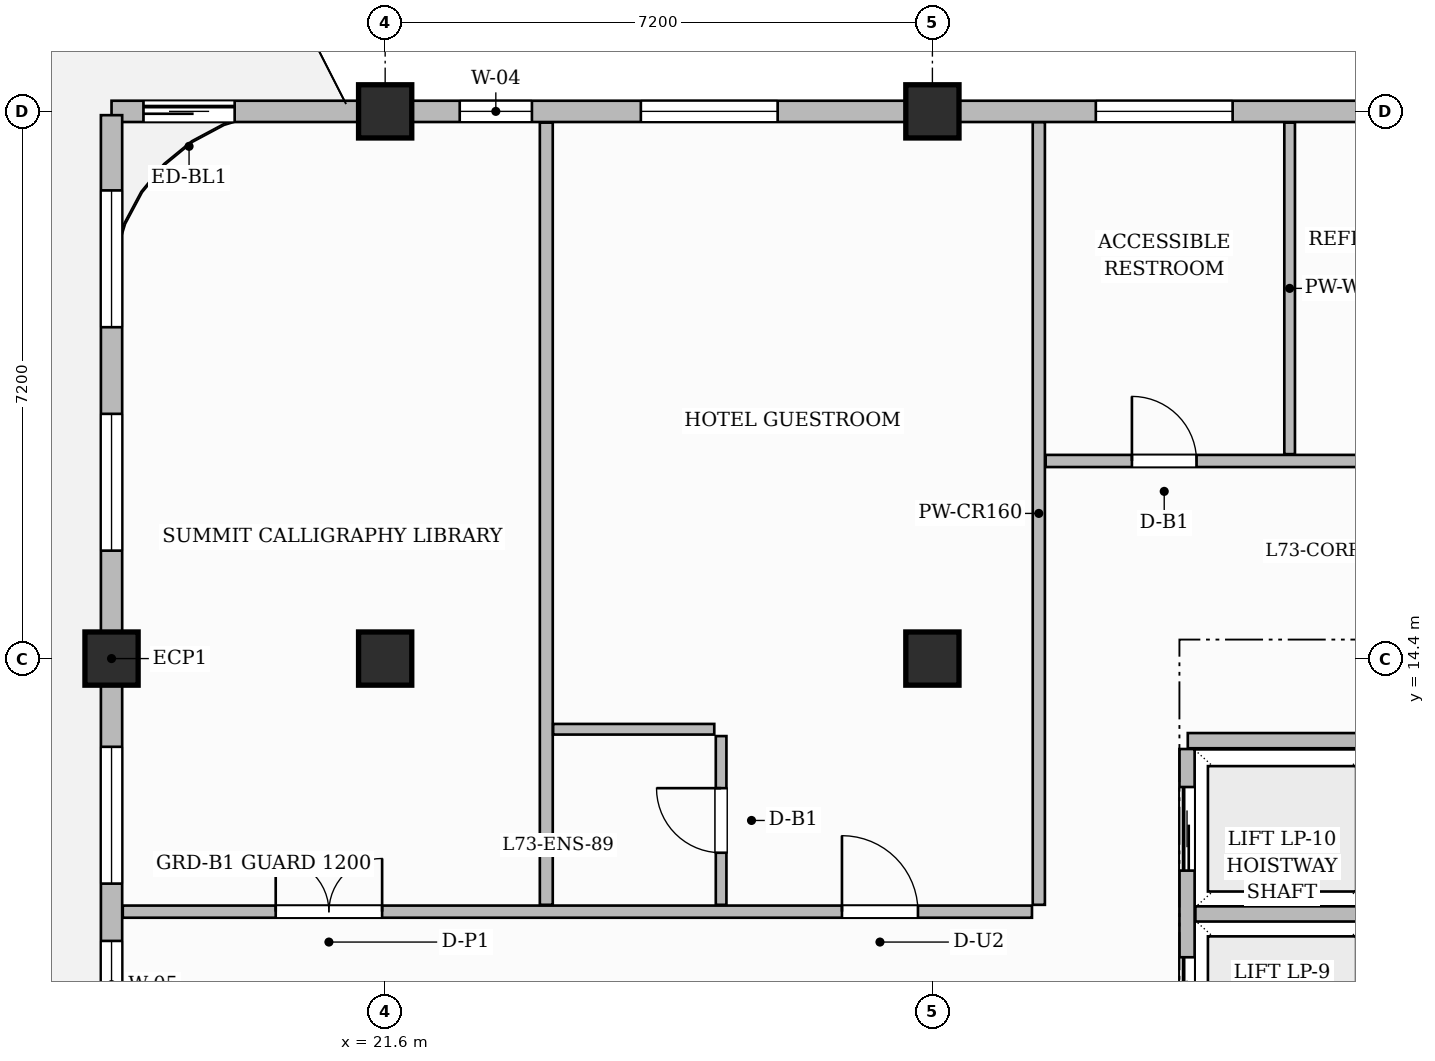
"""IFC4 building model, lengths in metres.
Left out: names, types, materials, properties, quantities, classifications, styles, units other than length and angle.
Written with IfcOpenShell. Run it as: python <this file> out.ifc"""

import sys

from ifc_helpers import new_model, si_unit, direction, frame, frame_2d, origin, origin_2d, place, context, subcontext, project, spatial, rectangle, extrude, source, transform, mapped, element, fill, save


model = new_model("IFC4")
c1 = context("Model", 3, precision=1e-05, world=origin(), true_north=direction((0.0, 1.0)))
c2 = subcontext(c1, "Body", "Model", "MODEL_VIEW")
j1 = project(units=[si_unit("LENGTHUNIT", "METRE"), si_unit("PLANEANGLEUNIT", "RADIAN")], contexts=[c1])
p1 = place(None, origin())
s1 = spatial("IfcSite", under=j1, at=p1, CompositionType="ELEMENT")
p2 = place(p1, origin())
s2 = spatial("IfcBuilding", under=s1, at=p2, CompositionType="ELEMENT")
p3 = place(p2, frame((0.0, 0.0, 290.45)))
s3 = spatial("IfcBuildingStorey", under=s2, at=p3, CompositionType="ELEMENT", Elevation=290.45)
m1 = source(origin(), c2, "Body", "SweptSolid", [
    extrude(rectangle(XDim=0.7, YDim=0.7, at=origin_2d()), origin(), (0.0, 0.0, 1.0), 3.85),
])
for number, where, z_axis, x_axis in (
    (1, (21.6, 14.4, 0.0), (0.0, 0.0, 1.0), (1.0, 0.0, 0.0)),
    (2, (21.6, 21.6, 0.0), (0.0, 0.0, 1.0), (1.0, 0.0, 0.0)),
    (3, (28.8, 14.4, 0.0), (0.0, 0.0, 1.0), (1.0, 0.0, 0.0)),
    (4, (28.8, 21.6, 0.0), (0.0, 0.0, 1.0), (1.0, 0.0, 0.0)),
    (5, (18.0, 14.4, 0.0), (0.0, 0.0, 1.0), (1.0, 0.0, 0.0)),
):
    element("IfcColumn", number, at=place(p3, frame(where, z_axis=z_axis, x_axis=x_axis)), inside=s3, PredefinedType="COLUMN", context=c2, shape_type="MappedRepresentation", body=[
        mapped(m1, transform((0.0, 0.0, 0.0), scale=1.0)),
    ])
p4 = place(p3, frame((32.16, 13.32, 0.0), z_axis=(0.0, 0.0, 1.0), x_axis=(1.0, 0.0, 0.0)))
e6 = element("IfcWall", 6, at=p4, inside=s3, PredefinedType="PARTITIONING", context=c2, shape_type="SweptSolid", body=[
    extrude(rectangle(XDim=2.385, YDim=0.2, at=frame_2d((1.192, 0.0))), origin(), (0.0, 0.0, 1.0), 3.55),
])
p5 = place(p3, frame((32.15, 4.39, 0.0), z_axis=(0.0, 0.0, 1.0), x_axis=(0.0, 1.0, 0.0)))
e7 = element("IfcWall", 7, at=p5, inside=s3, PredefinedType="PARTITIONING", context=c2, shape_type="SweptSolid", body=[
    extrude(rectangle(XDim=8.82, YDim=0.2, at=frame_2d((4.41, 0.0))), origin(), (0.0, 0.0, 1.0), 3.55),
])
p6 = place(p5, frame((0.5, 0.0, 0.0)))
e8 = element("IfcOpeningElement", 8, at=p6, cuts=e7, PredefinedType="OPENING", context=c2, shape_type="SweptSolid", body=[
    extrude(rectangle(XDim=1.1, YDim=2.2, at=frame_2d((0.55, 1.1))), frame((0.0, 0.11, 0.0), z_axis=(0.0, -1.0, 0.0), x_axis=(1.0, 0.0, 0.0)), (0.0, 0.0, 1.0), 0.22),
])
p7 = place(p5, frame((2.74, 0.0, 0.0)))
e9 = element("IfcOpeningElement", 9, at=p7, cuts=e7, PredefinedType="OPENING", context=c2, shape_type="SweptSolid", body=[
    extrude(rectangle(XDim=1.1, YDim=2.2, at=frame_2d((0.55, 1.1))), frame((0.0, 0.11, 0.0), z_axis=(0.0, -1.0, 0.0), x_axis=(1.0, 0.0, 0.0)), (0.0, 0.0, 1.0), 0.22),
])
p8 = place(p5, frame((4.98, 0.0, 0.0)))
e10 = element("IfcOpeningElement", 10, at=p8, cuts=e7, PredefinedType="OPENING", context=c2, shape_type="SweptSolid", body=[
    extrude(rectangle(XDim=1.1, YDim=2.2, at=frame_2d((0.55, 1.1))), frame((0.0, 0.11, 0.0), z_axis=(0.0, -1.0, 0.0), x_axis=(1.0, 0.0, 0.0)), (0.0, 0.0, 1.0), 0.22),
])
p9 = place(p5, frame((7.22, 0.0, 0.0)))
e11 = element("IfcOpeningElement", 11, at=p9, cuts=e7, PredefinedType="OPENING", context=c2, shape_type="SweptSolid", body=[
    extrude(rectangle(XDim=1.1, YDim=2.2, at=frame_2d((0.55, 1.1))), frame((0.0, 0.11, 0.0), z_axis=(0.0, -1.0, 0.0), x_axis=(1.0, 0.0, 0.0)), (0.0, 0.0, 1.0), 0.22),
])
p10 = place(p3, frame((32.26, 11.04, 0.0), z_axis=(0.0, 0.0, 1.0), x_axis=(1.0, 0.0, 0.0)))
e12 = element("IfcWall", 12, at=p10, inside=s3, PredefinedType="PARTITIONING", context=c2, shape_type="SweptSolid", body=[
    extrude(rectangle(XDim=2.255, YDim=0.2, at=frame_2d((1.127, 0.0))), origin(), (0.0, 0.0, 1.0), 3.55),
])
p11 = place(p3, frame((18.148, 11.07, 0.0), z_axis=(0.0, 0.0, 1.0), x_axis=(1.0, 0.0, 0.0)))
e13 = element("IfcWall", 13, at=p11, inside=s3, PredefinedType="PARTITIONING", context=c2, shape_type="SweptSolid", body=[
    extrude(rectangle(XDim=11.962, YDim=0.16, at=frame_2d((5.981, 0.0))), origin(), (0.0, 0.0, 1.0), 3.55),
])
p12 = place(p11, frame((2.012, 0.0, 0.0)))
e14 = element("IfcOpeningElement", 14, at=p12, cuts=e13, PredefinedType="OPENING", context=c2, shape_type="SweptSolid", body=[
    extrude(rectangle(XDim=1.4, YDim=2.35, at=frame_2d((0.7, 1.175))), frame((0.0, 0.09, 0.0), z_axis=(0.0, -1.0, 0.0), x_axis=(1.0, 0.0, 0.0)), (0.0, 0.0, 1.0), 0.18),
])
p13 = place(p11, frame((9.462, 0.0, 0.0)))
e15 = element("IfcOpeningElement", 15, at=p13, cuts=e13, PredefinedType="OPENING", context=c2, shape_type="SweptSolid", body=[
    extrude(rectangle(XDim=1.0, YDim=2.2, at=frame_2d((0.5, 1.1))), frame((0.0, 0.09, 0.0), z_axis=(0.0, -1.0, 0.0), x_axis=(1.0, 0.0, 0.0)), (0.0, 0.0, 1.0), 0.18),
])
p14 = place(p3, frame((30.2, 11.16, 0.0), z_axis=(0.0, 0.0, 1.0), x_axis=(0.0, 1.0, 0.0)))
e16 = element("IfcWall", 16, at=p14, inside=s3, PredefinedType="PARTITIONING", context=c2, shape_type="SweptSolid", body=[
    extrude(rectangle(XDim=10.3, YDim=0.16, at=frame_2d((5.15, 0.0))), origin(), (0.0, 0.0, 1.0), 3.55),
])
p15 = place(p3, frame((30.29, 17.0, 0.0), z_axis=(0.0, 0.0, 1.0), x_axis=(1.0, 0.0, 0.0)))
e17 = element("IfcWall", 17, at=p15, inside=s3, PredefinedType="PARTITIONING", context=c2, shape_type="SweptSolid", body=[
    extrude(rectangle(XDim=19.37, YDim=0.16, at=frame_2d((9.685, 0.0))), origin(), (0.0, 0.0, 1.0), 3.55),
])
p16 = place(p15, frame((1.135, 0.0, 0.0)))
e18 = element("IfcOpeningElement", 18, at=p16, cuts=e17, PredefinedType="OPENING", context=c2, shape_type="SweptSolid", body=[
    extrude(rectangle(XDim=0.85, YDim=2.1, at=frame_2d((0.425, 1.05))), frame((0.0, 0.09, 0.0), z_axis=(0.0, -1.0, 0.0), x_axis=(1.0, 0.0, 0.0)), (0.0, 0.0, 1.0), 0.18),
])
p17 = place(p15, frame((5.71, 0.0, 0.0)))
e19 = element("IfcOpeningElement", 19, at=p17, cuts=e17, PredefinedType="OPENING", context=c2, shape_type="SweptSolid", body=[
    extrude(rectangle(XDim=0.9, YDim=2.15, at=frame_2d((0.45, 1.075))), frame((0.0, 0.09, 0.0), z_axis=(0.0, -1.0, 0.0), x_axis=(1.0, 0.0, 0.0)), (0.0, 0.0, 1.0), 0.18),
])
p18 = place(p15, frame((10.635, 0.0, 0.0)))
e20 = element("IfcOpeningElement", 20, at=p18, cuts=e17, PredefinedType="OPENING", context=c2, shape_type="SweptSolid", body=[
    extrude(rectangle(XDim=0.95, YDim=2.15, at=frame_2d((0.475, 1.075))), frame((0.0, 0.09, 0.0), z_axis=(0.0, -1.0, 0.0), x_axis=(1.0, 0.0, 0.0)), (0.0, 0.0, 1.0), 0.18),
])
p19 = place(p15, frame((16.235, 0.0, 0.0)))
e21 = element("IfcOpeningElement", 21, at=p19, cuts=e17, PredefinedType="OPENING", context=c2, shape_type="SweptSolid", body=[
    extrude(rectangle(XDim=0.95, YDim=2.15, at=frame_2d((0.475, 1.075))), frame((0.0, 0.09, 0.0), z_axis=(0.0, -1.0, 0.0), x_axis=(1.0, 0.0, 0.0)), (0.0, 0.0, 1.0), 0.18),
])
p20 = place(p3, frame((33.5, 17.09, 0.0), z_axis=(0.0, 0.0, 1.0), x_axis=(0.0, 1.0, 0.0)))
e22 = element("IfcWall", 22, at=p20, inside=s3, PredefinedType="PARTITIONING", context=c2, shape_type="SweptSolid", body=[
    extrude(rectangle(XDim=4.362, YDim=0.14, at=frame_2d((2.181, 0.0))), origin(), (0.0, 0.0, 1.0), 3.55),
])
p21 = place(p3, frame((23.72, 11.16, 0.0), z_axis=(0.0, 0.0, 1.0), x_axis=(0.0, 1.0, 0.0)))
e23 = element("IfcWall", 23, at=p21, inside=s3, PredefinedType="PARTITIONING", context=c2, shape_type="SweptSolid", body=[
    extrude(rectangle(XDim=10.292, YDim=0.17, at=frame_2d((5.146, 0.0))), origin(), (0.0, 0.0, 1.0), 3.55),
])
p22 = place(p3, frame((26.02, 11.16, 0.0), z_axis=(0.0, 0.0, 1.0), x_axis=(0.0, 1.0, 0.0)))
e24 = element("IfcWall", 24, at=p22, inside=s3, PredefinedType="PARTITIONING", context=c2, shape_type="SweptSolid", body=[
    extrude(rectangle(XDim=2.22, YDim=0.14, at=frame_2d((1.11, 0.0))), origin(), (0.0, 0.0, 1.0), 3.55),
])
p23 = place(p22, frame((0.685, 0.0, 0.0)))
e25 = element("IfcOpeningElement", 25, at=p23, cuts=e24, PredefinedType="OPENING", context=c2, shape_type="SweptSolid", body=[
    extrude(rectangle(XDim=0.85, YDim=2.1, at=frame_2d((0.425, 1.05))), frame((0.0, 0.08, 0.0), z_axis=(0.0, -1.0, 0.0), x_axis=(1.0, 0.0, 0.0)), (0.0, 0.0, 1.0), 0.16),
])
p24 = place(p3, frame((23.81, 13.47, 0.0), z_axis=(0.0, 0.0, 1.0), x_axis=(1.0, 0.0, 0.0)))
e26 = element("IfcWall", 26, at=p24, inside=s3, PredefinedType="PARTITIONING", context=c2, shape_type="SweptSolid", body=[
    extrude(rectangle(XDim=2.12, YDim=0.14, at=frame_2d((1.06, 0.0))), origin(), (0.0, 0.0, 1.0), 3.55),
])
p25 = place(p3, frame((18.0, 21.6, 0.0), z_axis=(0.0, 0.0, 1.0), x_axis=(1.0, 0.0, 0.0)))
e27 = element("IfcWall", 27, at=p25, inside=s3, PredefinedType="SOLIDWALL", context=c2, shape_type="SweptSolid", body=[
    extrude(rectangle(XDim=31.8, YDim=0.28, at=frame_2d((15.9, 0.0))), origin(), (0.0, 0.0, 1.0), 3.135),
])
p26 = place(p25, frame((0.42, 0.0, 0.0)))
e28 = element("IfcOpeningElement", 28, at=p26, cuts=e27, PredefinedType="OPENING", context=c2, shape_type="SweptSolid", body=[
    extrude(rectangle(XDim=1.2, YDim=2.2, at=frame_2d((0.6, 1.1))), frame((0.0, 0.15, 0.0), z_axis=(0.0, -1.0, 0.0), x_axis=(1.0, 0.0, 0.0)), (0.0, 0.0, 1.0), 0.3),
])
p27 = place(p25, frame((4.581, 0.0, 0.8)))
e29 = element("IfcOpeningElement", 29, at=p27, cuts=e27, PredefinedType="OPENING", context=c2, shape_type="SweptSolid", body=[
    extrude(rectangle(XDim=0.95, YDim=1.75, at=frame_2d((0.475, 0.875))), frame((0.0, 0.15, 0.0), z_axis=(0.0, -1.0, 0.0), x_axis=(1.0, 0.0, 0.0)), (0.0, 0.0, 1.0), 0.3),
])
p28 = place(p25, frame((6.964, 0.0, 0.8)))
e30 = element("IfcOpeningElement", 30, at=p28, cuts=e27, PredefinedType="OPENING", context=c2, shape_type="SweptSolid", body=[
    extrude(rectangle(XDim=1.8, YDim=1.85, at=frame_2d((0.9, 0.925))), frame((0.0, 0.15, 0.0), z_axis=(0.0, -1.0, 0.0), x_axis=(1.0, 0.0, 0.0)), (0.0, 0.0, 1.0), 0.3),
])
p29 = place(p25, frame((12.95, 0.0, 0.8)))
e31 = element("IfcOpeningElement", 31, at=p29, cuts=e27, PredefinedType="OPENING", context=c2, shape_type="SweptSolid", body=[
    extrude(rectangle(XDim=1.8, YDim=1.85, at=frame_2d((0.9, 0.925))), frame((0.0, 0.15, 0.0), z_axis=(0.0, -1.0, 0.0), x_axis=(1.0, 0.0, 0.0)), (0.0, 0.0, 1.0), 0.3),
])
p30 = place(p25, frame((18.596, 0.0, 0.8)))
e32 = element("IfcOpeningElement", 32, at=p30, cuts=e27, PredefinedType="OPENING", context=c2, shape_type="SweptSolid", body=[
    extrude(rectangle(XDim=1.8, YDim=1.85, at=frame_2d((0.9, 0.925))), frame((0.0, 0.15, 0.0), z_axis=(0.0, -1.0, 0.0), x_axis=(1.0, 0.0, 0.0)), (0.0, 0.0, 1.0), 0.3),
])
p31 = place(p25, frame((21.729, 0.0, 0.8)))
e33 = element("IfcOpeningElement", 33, at=p31, cuts=e27, PredefinedType="OPENING", context=c2, shape_type="SweptSolid", body=[
    extrude(rectangle(XDim=1.15, YDim=1.8, at=frame_2d((0.575, 0.9))), frame((0.0, 0.15, 0.0), z_axis=(0.0, -1.0, 0.0), x_axis=(1.0, 0.0, 0.0)), (0.0, 0.0, 1.0), 0.3),
])
p32 = place(p25, frame((25.121, 0.0, 0.8)))
e34 = element("IfcOpeningElement", 34, at=p32, cuts=e27, PredefinedType="OPENING", context=c2, shape_type="SweptSolid", body=[
    extrude(rectangle(XDim=0.95, YDim=1.75, at=frame_2d((0.475, 0.875))), frame((0.0, 0.15, 0.0), z_axis=(0.0, -1.0, 0.0), x_axis=(1.0, 0.0, 0.0)), (0.0, 0.0, 1.0), 0.3),
])
p33 = place(p25, frame((27.804, 0.0, 0.8)))
e35 = element("IfcOpeningElement", 35, at=p33, cuts=e27, PredefinedType="OPENING", context=c2, shape_type="SweptSolid", body=[
    extrude(rectangle(XDim=1.8, YDim=1.85, at=frame_2d((0.9, 0.925))), frame((0.0, 0.15, 0.0), z_axis=(0.0, -1.0, 0.0), x_axis=(1.0, 0.0, 0.0)), (0.0, 0.0, 1.0), 0.3),
])
p34 = place(p3, frame((18.0, 0.05, 0.0), z_axis=(0.0, 0.0, 1.0), x_axis=(0.0, 1.0, 0.0)))
e36 = element("IfcWall", 36, at=p34, inside=s3, PredefinedType="SOLIDWALL", context=c2, shape_type="SweptSolid", body=[
    extrude(rectangle(XDim=21.5, YDim=0.28, at=frame_2d((10.75, 0.0))), origin(), (0.0, 0.0, 1.0), 3.55),
])
p35 = place(p34, frame((0.99, 0.0, 0.8)))
e37 = element("IfcOpeningElement", 37, at=p35, cuts=e36, PredefinedType="OPENING", context=c2, shape_type="SweptSolid", body=[
    extrude(rectangle(XDim=1.8, YDim=1.85, at=frame_2d((0.9, 0.925))), frame((0.0, 0.15, 0.0), z_axis=(0.0, -1.0, 0.0), x_axis=(1.0, 0.0, 0.0)), (0.0, 0.0, 1.0), 0.3),
])
p36 = place(p34, frame((3.93, 0.0, 0.8)))
e38 = element("IfcOpeningElement", 38, at=p36, cuts=e36, PredefinedType="OPENING", context=c2, shape_type="SweptSolid", body=[
    extrude(rectangle(XDim=1.8, YDim=1.85, at=frame_2d((0.9, 0.925))), frame((0.0, 0.15, 0.0), z_axis=(0.0, -1.0, 0.0), x_axis=(1.0, 0.0, 0.0)), (0.0, 0.0, 1.0), 0.3),
])
p37 = place(p34, frame((9.485, 0.0, 0.8)))
e39 = element("IfcOpeningElement", 39, at=p37, cuts=e36, PredefinedType="OPENING", context=c2, shape_type="SweptSolid", body=[
    extrude(rectangle(XDim=1.15, YDim=1.8, at=frame_2d((0.575, 0.9))), frame((0.0, 0.15, 0.0), z_axis=(0.0, -1.0, 0.0), x_axis=(1.0, 0.0, 0.0)), (0.0, 0.0, 1.0), 0.3),
])
p38 = place(p34, frame((11.389, 0.0, 0.8)))
e40 = element("IfcOpeningElement", 40, at=p38, cuts=e36, PredefinedType="OPENING", context=c2, shape_type="SweptSolid", body=[
    extrude(rectangle(XDim=1.8, YDim=1.85, at=frame_2d((0.9, 0.925))), frame((0.0, 0.15, 0.0), z_axis=(0.0, -1.0, 0.0), x_axis=(1.0, 0.0, 0.0)), (0.0, 0.0, 1.0), 0.3),
])
p39 = place(p34, frame((15.77, 0.0, 0.8)))
e41 = element("IfcOpeningElement", 41, at=p39, cuts=e36, PredefinedType="OPENING", context=c2, shape_type="SweptSolid", body=[
    extrude(rectangle(XDim=1.8, YDim=1.85, at=frame_2d((0.9, 0.925))), frame((0.0, 0.15, 0.0), z_axis=(0.0, -1.0, 0.0), x_axis=(1.0, 0.0, 0.0)), (0.0, 0.0, 1.0), 0.3),
])
p40 = place(p34, frame((18.71, 0.0, 0.8)))
e42 = element("IfcOpeningElement", 42, at=p40, cuts=e36, PredefinedType="OPENING", context=c2, shape_type="SweptSolid", body=[
    extrude(rectangle(XDim=1.8, YDim=1.85, at=frame_2d((0.9, 0.925))), frame((0.0, 0.15, 0.0), z_axis=(0.0, -1.0, 0.0), x_axis=(1.0, 0.0, 0.0)), (0.0, 0.0, 1.0), 0.3),
])
m2 = source(origin(), c2, "Body", "SweptSolid", [
    extrude(rectangle(XDim=0.85, YDim=2.1, at=frame_2d((0.425, 1.05))), frame((0.0, 0.025, 0.0), z_axis=(0.0, -1.0, 0.0), x_axis=(1.0, 0.0, 0.0)), (0.0, 0.0, 1.0), 0.05),
])
p41 = place(p16, origin())
e43 = element("IfcDoor", 43, at=p41, inside=s3, OperationType="SINGLE_SWING_LEFT", PredefinedType="DOOR", context=c2, shape_type="MappedRepresentation", body=[
    mapped(m2, transform((0.0, 0.0, 0.0), scale=1.0)),
])
fill(e18, e43)
m3 = source(origin(), c2, "Body", "SweptSolid", [
    extrude(rectangle(XDim=1.4, YDim=2.35, at=frame_2d((0.7, 1.175))), frame((0.0, 0.025, 0.0), z_axis=(0.0, -1.0, 0.0), x_axis=(1.0, 0.0, 0.0)), (0.0, 0.0, 1.0), 0.05),
])
p42 = place(p12, origin())
e44 = element("IfcDoor", 44, at=p42, inside=s3, OperationType="DOUBLE_DOOR_SINGLE_SWING", PredefinedType="DOOR", context=c2, shape_type="MappedRepresentation", body=[
    mapped(m3, transform((0.0, 0.0, 0.0), scale=1.0)),
])
fill(e14, e44)
p43 = place(p23, origin())
e45 = element("IfcDoor", 45, at=p43, inside=s3, OperationType="SINGLE_SWING_RIGHT", PredefinedType="DOOR", context=c2, shape_type="MappedRepresentation", body=[
    mapped(m2, transform((0.0, 0.0, 0.0), scale=1.0)),
])
fill(e25, e45)
m4 = source(origin(), c2, "Body", "SweptSolid", [
    extrude(rectangle(XDim=1.0, YDim=2.2, at=frame_2d((0.5, 1.1))), frame((0.0, 0.025, 0.0), z_axis=(0.0, -1.0, 0.0), x_axis=(1.0, 0.0, 0.0)), (0.0, 0.0, 1.0), 0.05),
])
p44 = place(p13, origin())
e46 = element("IfcDoor", 46, at=p44, inside=s3, OperationType="SINGLE_SWING_LEFT", PredefinedType="DOOR", context=c2, shape_type="MappedRepresentation", body=[
    mapped(m4, transform((0.0, 0.0, 0.0), scale=1.0)),
])
fill(e15, e46)
m5 = source(origin(), c2, "Body", "SweptSolid", [
    extrude(rectangle(XDim=1.1, YDim=2.2, at=frame_2d((0.55, 1.1))), frame((0.0, 0.025, 0.0), z_axis=(0.0, -1.0, 0.0), x_axis=(1.0, 0.0, 0.0)), (0.0, 0.0, 1.0), 0.05),
])
p45 = place(p8, origin())
e47 = element("IfcDoor", 47, at=p45, inside=s3, OperationType="SLIDING_TO_LEFT", PredefinedType="DOOR", context=c2, shape_type="MappedRepresentation", body=[
    mapped(m5, transform((0.0, 0.0, 0.0), scale=1.0)),
])
fill(e10, e47)
p46 = place(p9, origin())
e48 = element("IfcDoor", 48, at=p46, inside=s3, OperationType="SLIDING_TO_LEFT", PredefinedType="DOOR", context=c2, shape_type="MappedRepresentation", body=[
    mapped(m5, transform((0.0, 0.0, 0.0), scale=1.0)),
])
fill(e11, e48)
m6 = source(origin(), c2, "Body", "SweptSolid", [
    extrude(rectangle(XDim=1.2, YDim=2.2, at=frame_2d((0.6, 1.1))), frame((0.0, 0.025, 0.0), z_axis=(0.0, -1.0, 0.0), x_axis=(1.0, 0.0, 0.0)), (0.0, 0.0, 1.0), 0.05),
])
p47 = place(p26, origin())
e49 = element("IfcDoor", 49, at=p47, inside=s3, OperationType="SLIDING_TO_LEFT", PredefinedType="DOOR", context=c2, shape_type="MappedRepresentation", body=[
    mapped(m6, transform((0.0, 0.0, 0.0), scale=1.0)),
])
fill(e28, e49)
m7 = source(origin(), c2, "Body", "SweptSolid", [
    extrude(rectangle(XDim=0.95, YDim=1.75, at=frame_2d((0.475, 0.875))), frame((0.0, 0.03, 0.0), z_axis=(0.0, -1.0, 0.0), x_axis=(1.0, 0.0, 0.0)), (0.0, 0.0, 1.0), 0.06),
])
p48 = place(p27, origin())
e50 = element("IfcWindow", 50, at=p48, inside=s3, PartitioningType="SINGLE_PANEL", PredefinedType="WINDOW", context=c2, shape_type="MappedRepresentation", body=[
    mapped(m7, transform((0.0, 0.0, 0.0), scale=1.0)),
])
fill(e29, e50)
m8 = source(origin(), c2, "Body", "SweptSolid", [
    extrude(rectangle(XDim=1.8, YDim=1.85, at=frame_2d((0.9, 0.925))), frame((0.0, 0.03, 0.0), z_axis=(0.0, -1.0, 0.0), x_axis=(1.0, 0.0, 0.0)), (0.0, 0.0, 1.0), 0.06),
])
p49 = place(p28, origin())
e51 = element("IfcWindow", 51, at=p49, inside=s3, PartitioningType="DOUBLE_PANEL_VERTICAL", PredefinedType="WINDOW", context=c2, shape_type="MappedRepresentation", body=[
    mapped(m8, transform((0.0, 0.0, 0.0), scale=1.0)),
])
fill(e30, e51)
p50 = place(p29, origin())
e52 = element("IfcWindow", 52, at=p50, inside=s3, PartitioningType="DOUBLE_PANEL_VERTICAL", PredefinedType="WINDOW", context=c2, shape_type="MappedRepresentation", body=[
    mapped(m8, transform((0.0, 0.0, 0.0), scale=1.0)),
])
fill(e31, e52)
m9 = source(origin(), c2, "Body", "SweptSolid", [
    extrude(rectangle(XDim=1.15, YDim=1.8, at=frame_2d((0.575, 0.9))), frame((0.0, 0.03, 0.0), z_axis=(0.0, -1.0, 0.0), x_axis=(1.0, 0.0, 0.0)), (0.0, 0.0, 1.0), 0.06),
])
p51 = place(p37, origin())
e53 = element("IfcWindow", 53, at=p51, inside=s3, PartitioningType="SINGLE_PANEL", PredefinedType="WINDOW", context=c2, shape_type="MappedRepresentation", body=[
    mapped(m9, transform((0.0, 0.0, 0.0), scale=1.0)),
])
fill(e39, e53)
p52 = place(p38, origin())
e54 = element("IfcWindow", 54, at=p52, inside=s3, PartitioningType="DOUBLE_PANEL_VERTICAL", PredefinedType="WINDOW", context=c2, shape_type="MappedRepresentation", body=[
    mapped(m8, transform((0.0, 0.0, 0.0), scale=1.0)),
])
fill(e40, e54)
p53 = place(p39, origin())
e55 = element("IfcWindow", 55, at=p53, inside=s3, PartitioningType="DOUBLE_PANEL_VERTICAL", PredefinedType="WINDOW", context=c2, shape_type="MappedRepresentation", body=[
    mapped(m8, transform((0.0, 0.0, 0.0), scale=1.0)),
])
fill(e41, e55)
p54 = place(p40, origin())
e56 = element("IfcWindow", 56, at=p54, inside=s3, PartitioningType="DOUBLE_PANEL_VERTICAL", PredefinedType="WINDOW", context=c2, shape_type="MappedRepresentation", body=[
    mapped(m8, transform((0.0, 0.0, 0.0), scale=1.0)),
])
fill(e42, e56)
save(model, sys.argv[1])
